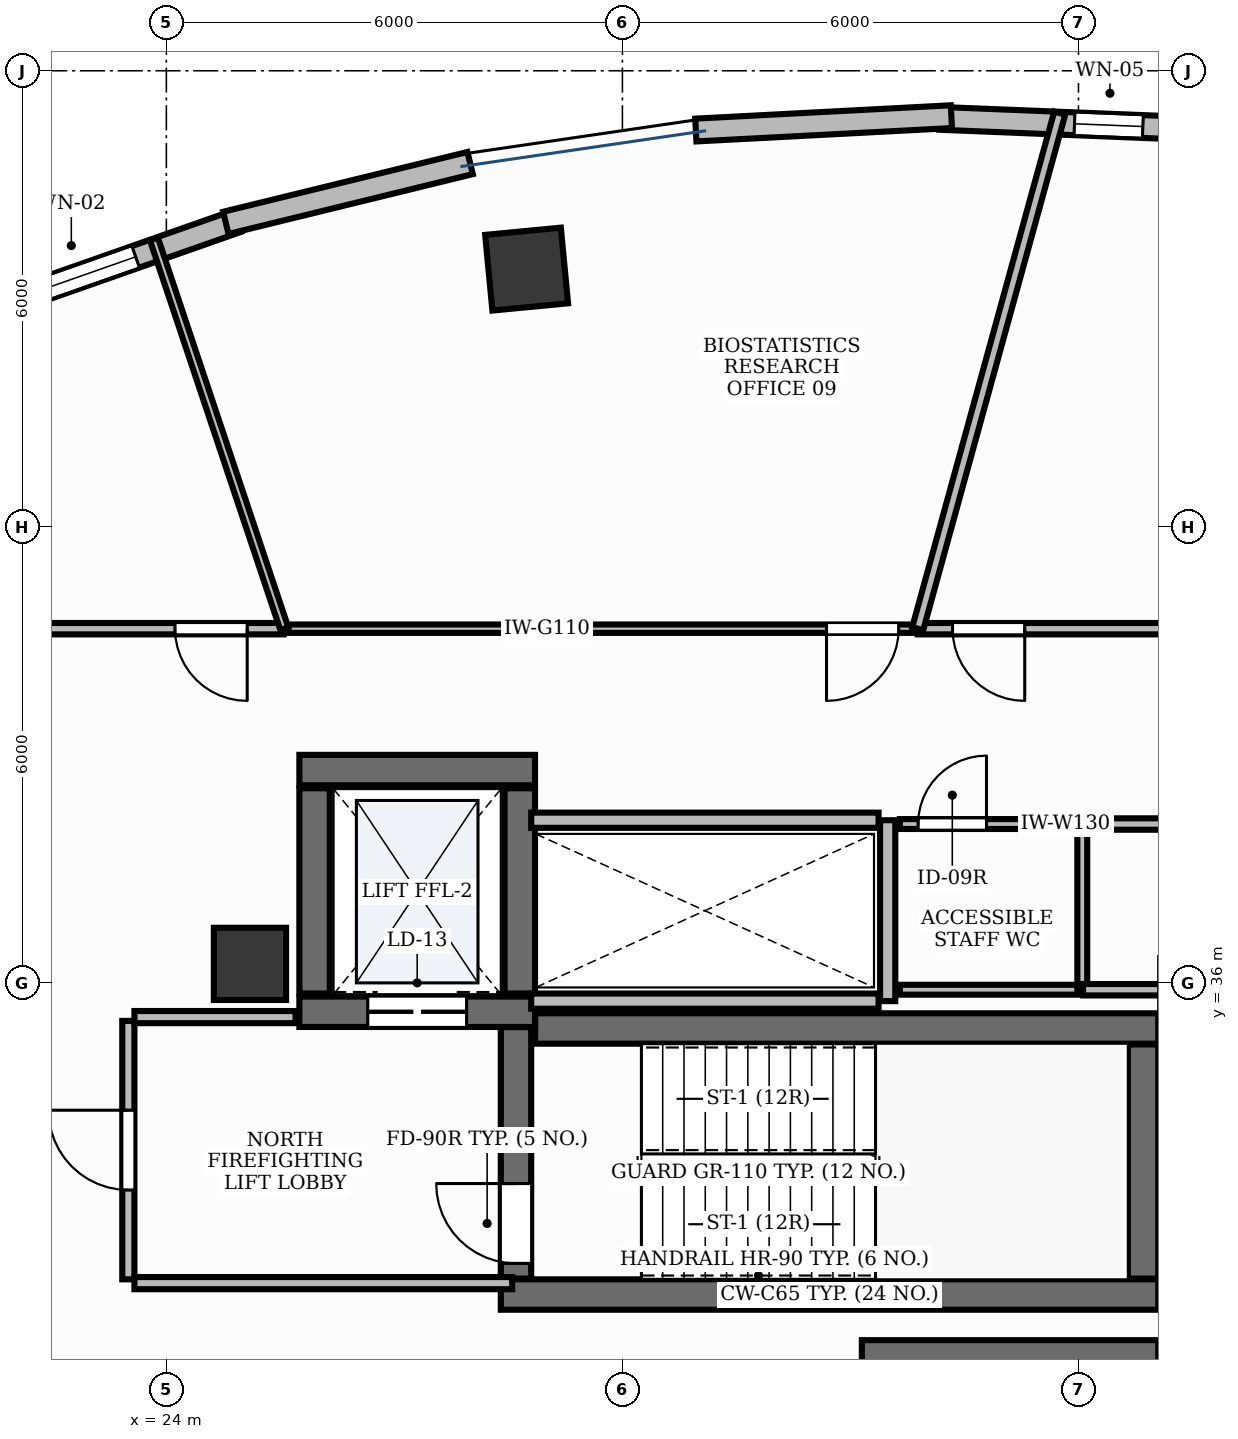
"""IFC4 building model, lengths in metres.
Left out: names, types, materials, properties, quantities, classifications, styles, units other than length and angle.
Written with IfcOpenShell. Run it as: python <this file> out.ifc"""

import sys

from ifc_helpers import new_model, si_unit, direction, frame, frame_2d, origin, origin_2d, place, context, subcontext, project, spatial, rectangle, extrude, element, fill, save


model = new_model("IFC4")
c1 = context("Model", 3, precision=1e-05, world=origin(), true_north=direction((0.0, 1.0)))
c2 = subcontext(c1, "Body", "Model", "MODEL_VIEW")
j1 = project(units=[si_unit("LENGTHUNIT", "METRE"), si_unit("PLANEANGLEUNIT", "RADIAN")], contexts=[c1])
p1 = place(None, origin())
s1 = spatial("IfcSite", under=j1, at=p1, CompositionType="ELEMENT")
p2 = place(p1, origin())
s2 = spatial("IfcBuilding", under=s1, at=p2, CompositionType="ELEMENT")
p3 = place(p2, frame((0.0, 0.0, 158.4)))
s3 = spatial("IfcBuildingStorey", under=s2, at=p3, CompositionType="ELEMENT", Elevation=158.4)
p4 = place(p3, frame((28.852, 35.4, 0.0), z_axis=(0.0, 0.0, 1.0), x_axis=(1.0, 0.0, 0.0)))
e1 = element("IfcWall", 1, at=p4, inside=s3, PredefinedType="SHEAR", context=c2, shape_type="SweptSolid", body=[
    extrude(rectangle(XDim=8.198, YDim=0.4, at=frame_2d((4.099, 0.0))), origin(), (0.0, 0.0, 1.0), 3.9),
])
p5 = place(p3, frame((28.4, 31.9, 0.0), z_axis=(0.0, 0.0, 1.0), x_axis=(1.0, 0.0, 0.0)))
e2 = element("IfcWall", 2, at=p5, inside=s3, PredefinedType="SHEAR", context=c2, shape_type="SweptSolid", body=[
    extrude(rectangle(XDim=8.65, YDim=0.4, at=frame_2d((4.325, 0.0))), origin(), (0.0, 0.0, 1.0), 3.9),
])
p6 = place(p3, frame((36.85, 32.11, 0.0), z_axis=(0.0, 0.0, 1.0), x_axis=(0.0, 1.0, 0.0)))
e3 = element("IfcWall", 3, at=p6, inside=s3, PredefinedType="SHEAR", context=c2, shape_type="SweptSolid", body=[
    extrude(rectangle(XDim=3.08, YDim=0.4, at=frame_2d((1.54, 0.0))), origin(), (0.0, 0.0, 1.0), 3.9),
])
p7 = place(p3, frame((28.6, 32.11, 0.0), z_axis=(0.0, 0.0, 1.0), x_axis=(0.0, 1.0, 0.0)))
e4 = element("IfcWall", 4, at=p7, inside=s3, PredefinedType="SHEAR", context=c2, shape_type="SweptSolid", body=[
    extrude(rectangle(XDim=3.308, YDim=0.4, at=frame_2d((1.654, 0.0))), origin(), (0.0, 0.0, 1.0), 3.9),
])
p8 = place(p7, frame((0.2, 0.0, 0.0)))
e5 = element("IfcOpeningElement", 5, at=p8, cuts=e4, PredefinedType="OPENING", context=c2, shape_type="SweptSolid", body=[
    extrude(rectangle(XDim=1.05, YDim=2.15, at=frame_2d((0.525, 1.075))), frame((0.0, 0.215, 0.0), z_axis=(0.0, -1.0, 0.0), x_axis=(1.0, 0.0, 0.0)), (0.0, 0.0, 1.0), 0.43),
])
p9 = place(p3, frame((33.15, 31.1, 0.0), z_axis=(0.0, 0.0, 1.0), x_axis=(1.0, 0.0, 0.0)))
e6 = element("IfcWall", 6, at=p9, inside=s3, PredefinedType="SHEAR", context=c2, shape_type="SweptSolid", body=[
    extrude(rectangle(XDim=3.9, YDim=0.4, at=frame_2d((1.95, 0.0))), origin(), (0.0, 0.0, 1.0), 3.9),
])
p10 = place(p3, frame((25.75, 38.8, 0.0), z_axis=(0.0, 0.0, 1.0), x_axis=(1.0, 0.0, 0.0)))
e7 = element("IfcWall", 7, at=p10, inside=s3, PredefinedType="SHEAR", context=c2, shape_type="SweptSolid", body=[
    extrude(rectangle(XDim=3.1, YDim=0.4, at=frame_2d((1.55, 0.0))), origin(), (0.0, 0.0, 1.0), 3.9),
])
p11 = place(p3, frame((25.75, 35.62, 0.0), z_axis=(0.0, 0.0, 1.0), x_axis=(1.0, 0.0, 0.0)))
e8 = element("IfcWall", 8, at=p11, inside=s3, PredefinedType="SHEAR", context=c2, shape_type="SweptSolid", body=[
    extrude(rectangle(XDim=3.1, YDim=0.4, at=frame_2d((1.55, 0.0))), origin(), (0.0, 0.0, 1.0), 3.9),
])
p12 = place(p11, frame((0.9, 0.0, 0.0)))
e9 = element("IfcOpeningElement", 9, at=p12, cuts=e8, PredefinedType="OPENING", context=c2, shape_type="SweptSolid", body=[
    extrude(rectangle(XDim=1.3, YDim=2.2, at=frame_2d((0.65, 1.1))), frame((0.0, 0.215, 0.0), z_axis=(0.0, -1.0, 0.0), x_axis=(1.0, 0.0, 0.0)), (0.0, 0.0, 1.0), 0.43),
])
for number, where, z_axis, x_axis in (
    (10, (25.95, 35.86, 0.0), (0.0, 0.0, 1.0), (0.0, 1.0, 0.0)),
    (11, (28.65, 35.86, 0.0), (0.0, 0.0, 1.0), (0.0, 1.0, 0.0)),
):
    element("IfcWall", number, at=place(p3, frame(where, z_axis=z_axis, x_axis=x_axis)), inside=s3, PredefinedType="SHEAR", context=c2, shape_type="SweptSolid", body=[
        extrude(rectangle(XDim=2.7, YDim=0.4, at=frame_2d((1.35, 0.0))), origin(), (0.0, 0.0, 1.0), 3.9),
    ])
p13 = place(p3, frame((25.1, 36.25, -0.0), z_axis=(0.0, 0.0, 1.0), x_axis=(1.0, 0.0, 0.0)))
e12 = element("IfcColumn", 12, at=p13, inside=s3, PredefinedType="PILASTER", context=c2, shape_type="SweptSolid", body=[
    extrude(rectangle(XDim=0.95, YDim=0.95, at=origin_2d()), origin(), (0.0, 0.0, 1.0), 3.901),
])
p14 = place(p3, frame((28.74, 45.39, -0.0), z_axis=(0.0, 0.0, 1.0), x_axis=(0.995462868748, 0.095150811579, 0.0)))
e13 = element("IfcColumn", 13, at=p14, inside=s3, PredefinedType="COLUMN", context=c2, shape_type="SweptSolid", body=[
    extrude(rectangle(XDim=1.0, YDim=1.0, at=origin_2d()), origin(), (0.0, 0.0, 1.0), 3.901),
])
p15 = place(p3, frame((37.5, 47.24, 0.0), z_axis=(0.0, 0.0, 1.0), x_axis=(-0.999191674443, 0.040199474165, 0.0)))
e14 = element("IfcWall", 14, at=p15, inside=s3, PredefinedType="STANDARD", context=c2, shape_type="SweptSolid", body=[
    extrude(rectangle(XDim=3.328, YDim=0.3, at=frame_2d((1.664, 0.0))), origin(), (0.0, 0.0, 1.0), 3.47),
])
p16 = place(p15, frame((0.653, 0.0, 0.95)))
e15 = element("IfcOpeningElement", 15, at=p16, cuts=e14, PredefinedType="OPENING", context=c2, shape_type="SweptSolid", body=[
    extrude(rectangle(XDim=0.9, YDim=1.8, at=frame_2d((0.45, 0.9))), frame((0.0, 0.165, 0.0), z_axis=(0.0, -1.0, 0.0), x_axis=(1.0, 0.0, 0.0)), (0.0, 0.0, 1.0), 0.33),
])
p17 = place(p3, frame((24.937, 46.023, 0.0), z_axis=(0.0, 0.0, 1.0), x_axis=(-0.943495444321, -0.331385495377, 0.0)))
e16 = element("IfcWall", 16, at=p17, inside=s3, PredefinedType="STANDARD", context=c2, shape_type="SweptSolid", body=[
    extrude(rectangle(XDim=3.214, YDim=0.3, at=frame_2d((1.607, 0.0))), origin(), (0.0, 0.0, 1.0), 3.9),
])
p18 = place(p17, frame((1.42, 0.0, 0.95)))
e17 = element("IfcOpeningElement", 17, at=p18, cuts=e16, PredefinedType="OPENING", context=c2, shape_type="SweptSolid", body=[
    extrude(rectangle(XDim=1.5, YDim=1.8, at=frame_2d((0.75, 0.9))), frame((0.0, 0.165, 0.0), z_axis=(0.0, -1.0, 0.0), x_axis=(1.0, 0.0, 0.0)), (0.0, 0.0, 1.0), 0.33),
])
p19 = place(p3, frame((34.328, 47.396, 0.0), z_axis=(0.0, 0.0, 1.0), x_axis=(-0.998639777298, -0.052140149581, 0.0)))
e18 = element("IfcWall", 18, at=p19, inside=s3, PredefinedType="STANDARD", context=c2, shape_type="SweptSolid", body=[
    extrude(rectangle(XDim=3.367, YDim=0.3, at=frame_2d((1.683, 0.0))), origin(), (0.0, 0.0, 1.0), 3.47),
])
p20 = place(p3, frame((27.996, 46.786, 0.0), z_axis=(0.0, 0.0, 1.0), x_axis=(-0.971328615467, -0.237740868963, 0.0)))
e19 = element("IfcWall", 19, at=p20, inside=s3, PredefinedType="STANDARD", context=c2, shape_type="SweptSolid", body=[
    extrude(rectangle(XDim=3.309, YDim=0.3, at=frame_2d((1.654, 0.0))), origin(), (0.0, 0.0, 1.0), 3.9),
])
p21 = place(p3, frame((33.49, 35.76, 0.0), z_axis=(0.0, 0.0, 1.0), x_axis=(0.0, 1.0, 0.0)))
e20 = element("IfcWall", 20, at=p21, inside=s3, PredefinedType="PARTITIONING", context=c2, shape_type="SweptSolid", body=[
    extrude(rectangle(XDim=2.38, YDim=0.2, at=frame_2d((1.19, 0.0))), origin(), (0.0, 0.0, 1.0), 2.91),
])
for number, where, z_axis, x_axis in (
    (21, (28.8, 35.76, 0.0), (0.0, 0.0, 1.0), (1.0, 0.0, 0.0)),
    (22, (28.8, 38.14, 0.0), (0.0, 0.0, 1.0), (1.0, 0.0, 0.0)),
):
    element("IfcWall", number, at=place(p3, frame(where, z_axis=z_axis, x_axis=x_axis)), inside=s3, PredefinedType="PARTITIONING", context=c2, shape_type="SweptSolid", body=[
        extrude(rectangle(XDim=4.57, YDim=0.2, at=frame_2d((2.285, 0.0))), origin(), (0.0, 0.0, 1.0), 2.91),
    ])
p22 = place(p3, frame((23.5, 32.1, 0.0), z_axis=(0.0, 0.0, 1.0), x_axis=(0.0, 1.0, 0.0)))
e23 = element("IfcWall", 23, at=p22, inside=s3, PredefinedType="PARTITIONING", context=c2, shape_type="SweptSolid", body=[
    extrude(rectangle(XDim=3.4, YDim=0.16, at=frame_2d((1.7, 0.0))), origin(), (0.0, 0.0, 1.0), 2.91),
])
p23 = place(p22, frame((1.175, 0.0, 0.0)))
e24 = element("IfcOpeningElement", 24, at=p23, cuts=e23, PredefinedType="OPENING", context=c2, shape_type="SweptSolid", body=[
    extrude(rectangle(XDim=1.05, YDim=2.15, at=frame_2d((0.525, 1.075))), frame((0.0, 0.095, 0.0), z_axis=(0.0, -1.0, 0.0), x_axis=(1.0, 0.0, 0.0)), (0.0, 0.0, 1.0), 0.19),
])
p24 = place(p3, frame((23.58, 32.05, 0.0), z_axis=(0.0, 0.0, 1.0), x_axis=(1.0, 0.0, 0.0)))
e25 = element("IfcWall", 25, at=p24, inside=s3, PredefinedType="PARTITIONING", context=c2, shape_type="SweptSolid", body=[
    extrude(rectangle(XDim=4.97, YDim=0.16, at=frame_2d((2.485, 0.0))), origin(), (0.0, 0.0, 1.0), 2.91),
])
p25 = place(p3, frame((23.58, 35.55, 0.0), z_axis=(0.0, 0.0, 1.0), x_axis=(1.0, 0.0, 0.0)))
e26 = element("IfcWall", 26, at=p25, inside=s3, PredefinedType="PARTITIONING", context=c2, shape_type="SweptSolid", body=[
    extrude(rectangle(XDim=2.12, YDim=0.16, at=frame_2d((1.06, 0.0))), origin(), (0.0, 0.0, 1.0), 2.91),
])
p26 = place(p3, frame((33.65, 38.09, 0.0), z_axis=(0.0, 0.0, 1.0), x_axis=(1.0, 0.0, 0.0)))
e27 = element("IfcWall", 27, at=p26, inside=s3, PredefinedType="PARTITIONING", context=c2, shape_type="SweptSolid", body=[
    extrude(rectangle(XDim=2.4, YDim=0.13, at=frame_2d((1.2, 0.0))), origin(), (0.0, 0.0, 1.0), 2.91),
])
p27 = place(p26, frame((0.24, 0.0, 0.0)))
e28 = element("IfcOpeningElement", 28, at=p27, cuts=e27, PredefinedType="OPENING", context=c2, shape_type="SweptSolid", body=[
    extrude(rectangle(XDim=0.9, YDim=2.15, at=frame_2d((0.45, 1.075))), frame((0.0, 0.08, 0.0), z_axis=(0.0, -1.0, 0.0), x_axis=(1.0, 0.0, 0.0)), (0.0, 0.0, 1.0), 0.16),
])
p28 = place(p3, frame((37.2, 40.66, 0.0), z_axis=(0.0, 0.0, 1.0), x_axis=(-1.0, 0.0, 0.0)))
e29 = element("IfcWall", 29, at=p28, inside=s3, PredefinedType="PARTITIONING", context=c2, shape_type="SweptSolid", body=[
    extrude(rectangle(XDim=3.315, YDim=0.15, at=frame_2d((1.657, 0.0))), origin(), (0.0, 0.0, 1.0), 2.91),
])
p29 = place(p28, frame((1.907, 0.0, 0.0)))
e30 = element("IfcOpeningElement", 30, at=p29, cuts=e29, PredefinedType="OPENING", context=c2, shape_type="SweptSolid", body=[
    extrude(rectangle(XDim=0.95, YDim=2.15, at=frame_2d((0.475, 1.075))), frame((0.0, 0.09, 0.0), z_axis=(0.0, -1.0, 0.0), x_axis=(1.0, 0.0, 0.0)), (0.0, 0.0, 1.0), 0.18),
])
p30 = place(p3, frame((33.875, 40.66, 0.0), z_axis=(0.0, 0.0, 1.0), x_axis=(-1.0, 0.0, 0.0)))
e31 = element("IfcWall", 31, at=p30, inside=s3, PredefinedType="MOVABLE", context=c2, shape_type="SweptSolid", body=[
    extrude(rectangle(XDim=8.323, YDim=0.11, at=frame_2d((4.162, 0.0))), origin(), (0.0, 0.0, 1.0), 2.91),
])
p31 = place(p30, frame((0.24, 0.0, 0.0)))
e32 = element("IfcOpeningElement", 32, at=p31, cuts=e31, PredefinedType="OPENING", context=c2, shape_type="SweptSolid", body=[
    extrude(rectangle(XDim=0.95, YDim=2.15, at=frame_2d((0.475, 1.075))), frame((0.0, 0.07, 0.0), z_axis=(0.0, -1.0, 0.0), x_axis=(1.0, 0.0, 0.0)), (0.0, 0.0, 1.0), 0.14),
])
p32 = place(p3, frame((25.542, 40.66, 0.0), z_axis=(0.0, 0.0, 1.0), x_axis=(-1.0, 0.0, 0.0)))
e33 = element("IfcWall", 33, at=p32, inside=s3, PredefinedType="PARTITIONING", context=c2, shape_type="SweptSolid", body=[
    extrude(rectangle(XDim=3.792, YDim=0.15, at=frame_2d((1.896, 0.0))), origin(), (0.0, 0.0, 1.0), 2.91),
])
p33 = place(p32, frame((0.478, 0.0, 0.0)))
e34 = element("IfcOpeningElement", 34, at=p33, cuts=e33, PredefinedType="OPENING", context=c2, shape_type="SweptSolid", body=[
    extrude(rectangle(XDim=0.95, YDim=2.15, at=frame_2d((0.475, 1.075))), frame((0.0, 0.09, 0.0), z_axis=(0.0, -1.0, 0.0), x_axis=(1.0, 0.0, 0.0)), (0.0, 0.0, 1.0), 0.18),
])
p34 = place(p3, frame((36.05, 35.91, 0.0), z_axis=(0.0, 0.0, 1.0), x_axis=(-1.0, 0.0, 0.0)))
e35 = element("IfcWall", 35, at=p34, inside=s3, PredefinedType="PARTITIONING", context=c2, shape_type="SweptSolid", body=[
    extrude(rectangle(XDim=2.4, YDim=0.13, at=frame_2d((1.2, 0.0))), origin(), (0.0, 0.0, 1.0), 2.91),
])
p35 = place(p3, frame((36.05, 38.09, 0.0), z_axis=(0.0, 0.0, 1.0), x_axis=(0.0, -1.0, 0.0)))
e36 = element("IfcWall", 36, at=p35, inside=s3, PredefinedType="PARTITIONING", context=c2, shape_type="SweptSolid", body=[
    extrude(rectangle(XDim=2.18, YDim=0.13, at=frame_2d((1.09, 0.0))), origin(), (0.0, 0.0, 1.0), 2.91),
])
p36 = place(p3, frame((37.35, 35.91, 0.0), z_axis=(0.0, 0.0, 1.0), x_axis=(-1.0, 0.0, 0.0)))
e37 = element("IfcWall", 37, at=p36, inside=s3, PredefinedType="PARTITIONING", context=c2, shape_type="SweptSolid", body=[
    extrude(rectangle(XDim=1.29, YDim=0.15, at=frame_2d((0.645, 0.0))), origin(), (0.0, 0.0, 1.0), 2.91),
])
p37 = place(p3, frame((36.06, 38.09, 0.0), z_axis=(0.0, 0.0, 1.0), x_axis=(1.0, 0.0, 0.0)))
e38 = element("IfcWall", 38, at=p37, inside=s3, PredefinedType="PARTITIONING", context=c2, shape_type="SweptSolid", body=[
    extrude(rectangle(XDim=1.14, YDim=0.15, at=frame_2d((0.57, 0.0))), origin(), (0.0, 0.0, 1.0), 2.91),
])
p38 = place(p3, frame((33.885, 40.66, 0.0), z_axis=(0.0, 0.0, 1.0), x_axis=(0.26554760057, 0.964097750143, 0.0)))
e39 = element("IfcWall", 39, at=p38, inside=s3, PredefinedType="PARTITIONING", context=c2, shape_type="SweptSolid", body=[
    extrude(rectangle(XDim=7.036, YDim=0.15, at=frame_2d((3.518, 0.0))), origin(), (0.0, 0.0, 1.0), 2.91),
])
p39 = place(p3, frame((25.552, 40.66, 0.0), z_axis=(0.0, 0.0, 1.0), x_axis=(-0.317298174949, 0.948325823847, 0.0)))
e40 = element("IfcWall", 40, at=p39, inside=s3, PredefinedType="MOVABLE", context=c2, shape_type="SweptSolid", body=[
    extrude(rectangle(XDim=5.405, YDim=0.11, at=frame_2d((2.702, 0.0))), origin(), (0.0, 0.0, 1.0), 2.91),
])
p40 = place(p16, origin())
e41 = element("IfcWindow", 41, at=p40, inside=s3, PartitioningType="SINGLE_PANEL", PredefinedType="WINDOW", context=c2, shape_type="SweptSolid", body=[
    extrude(rectangle(XDim=0.9, YDim=1.8, at=frame_2d((0.45, 0.9))), frame((0.0, 0.03, 0.0), z_axis=(0.0, -1.0, 0.0), x_axis=(1.0, 0.0, 0.0)), (0.0, 0.0, 1.0), 0.06),
])
fill(e15, e41)
p41 = place(p18, origin())
e42 = element("IfcWindow", 42, at=p41, inside=s3, PartitioningType="DOUBLE_PANEL_VERTICAL", PredefinedType="WINDOW", context=c2, shape_type="SweptSolid", body=[
    extrude(rectangle(XDim=1.5, YDim=1.8, at=frame_2d((0.75, 0.9))), frame((0.0, 0.03, 0.0), z_axis=(0.0, -1.0, 0.0), x_axis=(1.0, 0.0, 0.0)), (0.0, 0.0, 1.0), 0.06),
])
fill(e17, e42)
p42 = place(p8, origin())
e43 = element("IfcDoor", 43, at=p42, inside=s3, OperationType="SINGLE_SWING_RIGHT", PredefinedType="DOOR", context=c2, shape_type="SweptSolid", body=[
    extrude(rectangle(XDim=1.05, YDim=2.15, at=frame_2d((0.525, 1.075))), frame((0.0, 0.025, 0.0), z_axis=(0.0, -1.0, 0.0), x_axis=(1.0, 0.0, 0.0)), (0.0, 0.0, 1.0), 0.05),
])
fill(e5, e43)
p43 = place(p12, origin())
e44 = element("IfcDoor", 44, at=p43, inside=s3, OperationType="DOUBLE_DOOR_SLIDING", PredefinedType="DOOR", context=c2, shape_type="SweptSolid", body=[
    extrude(rectangle(XDim=1.3, YDim=2.2, at=frame_2d((0.65, 1.1))), frame((0.0, 0.025, 0.0), z_axis=(0.0, -1.0, 0.0), x_axis=(1.0, 0.0, 0.0)), (0.0, 0.0, 1.0), 0.05),
])
fill(e9, e44)
p44 = place(p23, origin())
e45 = element("IfcDoor", 45, at=p44, inside=s3, OperationType="SINGLE_SWING_RIGHT", PredefinedType="DOOR", context=c2, shape_type="SweptSolid", body=[
    extrude(rectangle(XDim=1.05, YDim=2.15, at=frame_2d((0.525, 1.075))), frame((0.0, 0.025, 0.0), z_axis=(0.0, -1.0, 0.0), x_axis=(1.0, 0.0, 0.0)), (0.0, 0.0, 1.0), 0.05),
])
fill(e24, e45)
p45 = place(p27, origin())
e46 = element("IfcDoor", 46, at=p45, inside=s3, OperationType="SINGLE_SWING_RIGHT", PredefinedType="DOOR", context=c2, shape_type="SweptSolid", body=[
    extrude(rectangle(XDim=0.9, YDim=2.15, at=frame_2d((0.45, 1.075))), frame((0.0, 0.025, 0.0), z_axis=(0.0, -1.0, 0.0), x_axis=(1.0, 0.0, 0.0)), (0.0, 0.0, 1.0), 0.05),
])
fill(e28, e46)
p46 = place(p29, origin())
e47 = element("IfcDoor", 47, at=p46, inside=s3, OperationType="SINGLE_SWING_LEFT", PredefinedType="DOOR", context=c2, shape_type="SweptSolid", body=[
    extrude(rectangle(XDim=0.95, YDim=2.15, at=frame_2d((0.475, 1.075))), frame((0.0, 0.025, 0.0), z_axis=(0.0, -1.0, 0.0), x_axis=(1.0, 0.0, 0.0)), (0.0, 0.0, 1.0), 0.05),
])
fill(e30, e47)
p47 = place(p31, origin())
e48 = element("IfcDoor", 48, at=p47, inside=s3, OperationType="SINGLE_SWING_RIGHT", PredefinedType="DOOR", context=c2, shape_type="SweptSolid", body=[
    extrude(rectangle(XDim=0.95, YDim=2.15, at=frame_2d((0.475, 1.075))), frame((0.0, 0.025, 0.0), z_axis=(0.0, -1.0, 0.0), x_axis=(1.0, 0.0, 0.0)), (0.0, 0.0, 1.0), 0.05),
])
fill(e32, e48)
p48 = place(p33, origin())
e49 = element("IfcDoor", 49, at=p48, inside=s3, OperationType="SINGLE_SWING_LEFT", PredefinedType="DOOR", context=c2, shape_type="SweptSolid", body=[
    extrude(rectangle(XDim=0.95, YDim=2.15, at=frame_2d((0.475, 1.075))), frame((0.0, 0.025, 0.0), z_axis=(0.0, -1.0, 0.0), x_axis=(1.0, 0.0, 0.0)), (0.0, 0.0, 1.0), 0.05),
])
fill(e34, e49)
save(model, sys.argv[1])
